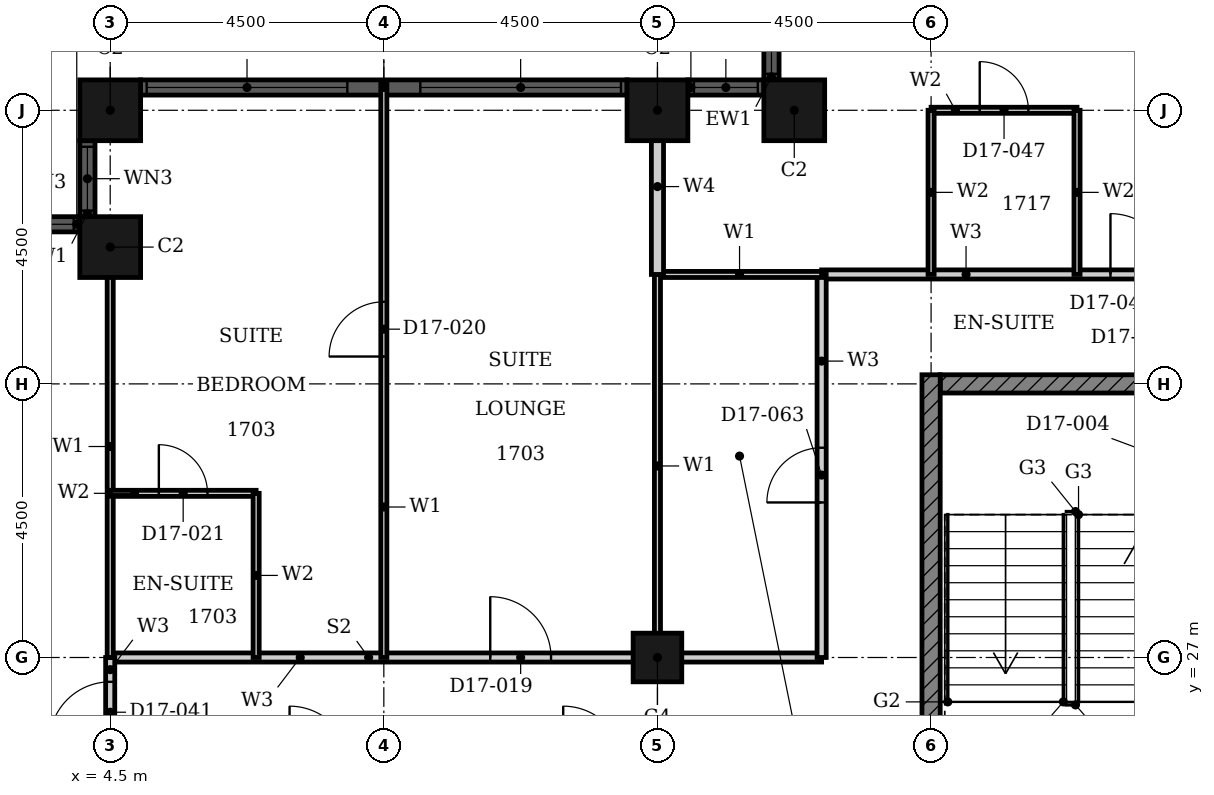
"""IFC4 building model, lengths in metres.
Left out: names, types, materials, properties, quantities, classifications, styles, units other than length and angle.
Written with IfcOpenShell. Run it as: python <this file> out.ifc"""

import sys

from ifc_helpers import new_model, si_unit, direction, frame, frame_2d, origin, origin_2d, place, context, subcontext, project, spatial, rectangle, hollow_rectangle, extrude, element, fill, save


model = new_model("IFC4")
c1 = context("Model", 3, precision=1e-05, world=origin(), true_north=direction((0.0, 1.0)))
c2 = subcontext(c1, "Body", "Model", "MODEL_VIEW")
j1 = project(units=[si_unit("LENGTHUNIT", "METRE"), si_unit("PLANEANGLEUNIT", "RADIAN")], contexts=[c1])
p1 = place(None, origin())
s1 = spatial("IfcSite", under=j1, at=p1, CompositionType="ELEMENT")
p2 = place(p1, origin())
s2 = spatial("IfcBuilding", under=s1, at=p2, CompositionType="ELEMENT")
p3 = place(p2, frame((0.0, 0.0, 74.4)))
s3 = spatial("IfcBuildingStorey", under=s2, at=p3, CompositionType="ELEMENT", Elevation=74.4)
for number, where, z_axis, x_axis in (
    (1, (15.75, 36.0, 0.0), (0.0, 0.0, 1.0), (1.0, 0.0, 0.0)),
    (2, (13.5, 36.0, 0.0), (0.0, 0.0, 1.0), (1.0, 0.0, 0.0)),
    (3, (4.5, 36.0, 0.0), (0.0, 0.0, 1.0), (1.0, 0.0, 0.0)),
    (4, (4.5, 33.75, 0.0), (0.0, 0.0, 1.0), (1.0, 0.0, 0.0)),
):
    element("IfcColumn", number, at=place(p3, frame(where, z_axis=z_axis, x_axis=x_axis)), inside=s3, PredefinedType="COLUMN", context=c2, shape_type="SweptSolid", body=[
        extrude(hollow_rectangle(XDim=1.0, YDim=1.0, WallThickness=0.032, at=origin_2d()), origin(), (0.0, 0.0, 1.0), 3.6),
    ])
p4 = place(p3, frame((13.5, 27.0, 0.0), z_axis=(0.0, 0.0, 1.0), x_axis=(1.0, 0.0, 0.0)))
e5 = element("IfcColumn", 5, at=p4, inside=s3, PredefinedType="COLUMN", context=c2, shape_type="SweptSolid", body=[
    extrude(hollow_rectangle(XDim=0.8, YDim=0.8, WallThickness=0.025, at=origin_2d()), origin(), (0.0, 0.0, 1.0), 3.6),
])
p5 = place(p3, frame((15.375, 37.75, 0.0), z_axis=(0.0, 0.0, 1.0), x_axis=(0.0, -1.0, 0.0)))
e6 = element("IfcWall", 6, at=p5, inside=s3, PredefinedType="SOLIDWALL", context=c2, shape_type="SweptSolid", body=[
    extrude(rectangle(XDim=1.25, YDim=0.25, at=frame_2d((0.625, 0.0))), origin(), (0.0, 0.0, 1.0), 3.6),
])
p6 = place(p5, frame((0.1, 0.0, 0.9)))
e7 = element("IfcOpeningElement", 7, at=p6, cuts=e6, PredefinedType="OPENING", context=c2, shape_type="SweptSolid", body=[
    extrude(rectangle(XDim=1.05, YDim=2.08, at=frame_2d((0.525, 1.04))), frame((0.0, 0.135, 0.0), z_axis=(0.0, -1.0, 0.0), x_axis=(1.0, 0.0, 0.0)), (0.0, 0.0, 1.0), 0.27),
])
p7 = place(p3, frame((15.25, 36.375, 0.0), z_axis=(0.0, 0.0, 1.0), x_axis=(-1.0, 0.0, 0.0)))
e8 = element("IfcWall", 8, at=p7, inside=s3, PredefinedType="SOLIDWALL", context=c2, shape_type="SweptSolid", body=[
    extrude(rectangle(XDim=1.25, YDim=0.25, at=frame_2d((0.625, 0.0))), origin(), (0.0, 0.0, 1.0), 3.6),
])
p8 = place(p7, frame((0.1, 0.0, 0.9)))
e9 = element("IfcOpeningElement", 9, at=p8, cuts=e8, PredefinedType="OPENING", context=c2, shape_type="SweptSolid", body=[
    extrude(rectangle(XDim=1.05, YDim=2.08, at=frame_2d((0.525, 1.04))), frame((0.0, 0.135, 0.0), z_axis=(0.0, -1.0, 0.0), x_axis=(1.0, 0.0, 0.0)), (0.0, 0.0, 1.0), 0.27),
])
p9 = place(p3, frame((13.0, 36.375, 0.0), z_axis=(0.0, 0.0, 1.0), x_axis=(-1.0, 0.0, 0.0)))
e10 = element("IfcWall", 10, at=p9, inside=s3, PredefinedType="SOLIDWALL", context=c2, shape_type="SweptSolid", body=[
    extrude(rectangle(XDim=8.0, YDim=0.25, at=frame_2d((4.0, 0.0))), origin(), (0.0, 0.0, 1.0), 3.6),
])
p10 = place(p9, frame((0.1, 0.0, 0.9)))
e11 = element("IfcOpeningElement", 11, at=p10, cuts=e10, PredefinedType="OPENING", context=c2, shape_type="SweptSolid", body=[
    extrude(rectangle(XDim=3.3, YDim=2.08, at=frame_2d((1.65, 1.04))), frame((0.0, 0.135, 0.0), z_axis=(0.0, -1.0, 0.0), x_axis=(1.0, 0.0, 0.0)), (0.0, 0.0, 1.0), 0.27),
])
p11 = place(p9, frame((4.6, 0.0, 0.9)))
e12 = element("IfcOpeningElement", 12, at=p11, cuts=e10, PredefinedType="OPENING", context=c2, shape_type="SweptSolid", body=[
    extrude(rectangle(XDim=3.3, YDim=2.08, at=frame_2d((1.65, 1.04))), frame((0.0, 0.135, 0.0), z_axis=(0.0, -1.0, 0.0), x_axis=(1.0, 0.0, 0.0)), (0.0, 0.0, 1.0), 0.27),
])
p12 = place(p3, frame((4.125, 35.5, 0.0), z_axis=(0.0, 0.0, 1.0), x_axis=(0.0, -1.0, 0.0)))
e13 = element("IfcWall", 13, at=p12, inside=s3, PredefinedType="SOLIDWALL", context=c2, shape_type="SweptSolid", body=[
    extrude(rectangle(XDim=1.25, YDim=0.25, at=frame_2d((0.625, 0.0))), origin(), (0.0, 0.0, 1.0), 3.6),
])
p13 = place(p12, frame((0.1, 0.0, 0.9)))
e14 = element("IfcOpeningElement", 14, at=p13, cuts=e13, PredefinedType="OPENING", context=c2, shape_type="SweptSolid", body=[
    extrude(rectangle(XDim=1.05, YDim=2.08, at=frame_2d((0.525, 1.04))), frame((0.0, 0.135, 0.0), z_axis=(0.0, -1.0, 0.0), x_axis=(1.0, 0.0, 0.0)), (0.0, 0.0, 1.0), 0.27),
])
p14 = place(p3, frame((4.0, 34.125, 0.0), z_axis=(0.0, 0.0, 1.0), x_axis=(-1.0, 0.0, 0.0)))
e15 = element("IfcWall", 15, at=p14, inside=s3, PredefinedType="SOLIDWALL", context=c2, shape_type="SweptSolid", body=[
    extrude(rectangle(XDim=1.25, YDim=0.25, at=frame_2d((0.625, 0.0))), origin(), (0.0, 0.0, 1.0), 3.6),
])
p15 = place(p14, frame((0.1, 0.0, 0.9)))
e16 = element("IfcOpeningElement", 16, at=p15, cuts=e15, PredefinedType="OPENING", context=c2, shape_type="SweptSolid", body=[
    extrude(rectangle(XDim=1.05, YDim=2.08, at=frame_2d((0.525, 1.04))), frame((0.0, 0.135, 0.0), z_axis=(0.0, -1.0, 0.0), x_axis=(1.0, 0.0, 0.0)), (0.0, 0.0, 1.0), 0.27),
])
p16 = place(p3, frame((18.15, 31.5, 0.0), z_axis=(0.0, 0.0, 1.0), x_axis=(1.0, 0.0, 0.0)))
e17 = element("IfcWall", 17, at=p16, inside=s3, PredefinedType="SHEAR", context=c2, shape_type="SweptSolid", body=[
    extrude(rectangle(XDim=6.797, YDim=0.3, at=frame_2d((3.398, 0.0))), origin(), (0.0, 0.0, 1.0), 3.3),
])
p17 = place(p16, frame((4.736, 0.0, 0.0)))
e18 = element("IfcOpeningElement", 18, at=p17, cuts=e17, PredefinedType="OPENING", context=c2, shape_type="SweptSolid", body=[
    extrude(rectangle(XDim=1.8, YDim=2.1, at=frame_2d((0.9, 1.05))), frame((0.0, 0.16, 0.0), z_axis=(0.0, -1.0, 0.0), x_axis=(1.0, 0.0, 0.0)), (0.0, 0.0, 1.0), 0.32),
])
p18 = place(p3, frame((18.0, 22.35, 0.0), z_axis=(0.0, 0.0, 1.0), x_axis=(0.0, 1.0, 0.0)))
e19 = element("IfcWall", 19, at=p18, inside=s3, PredefinedType="SHEAR", context=c2, shape_type="SweptSolid", body=[
    extrude(rectangle(XDim=9.3, YDim=0.3, at=frame_2d((4.65, 0.0))), origin(), (0.0, 0.0, 1.0), 3.3),
])
p19 = place(p3, frame((4.5, 27.0, 0.0), z_axis=(0.0, 0.0, 1.0), x_axis=(1.0, 0.0, 0.0)))
e20 = element("IfcWall", 20, at=p19, inside=s3, PredefinedType="PARTITIONING", context=c2, shape_type="SweptSolid", body=[
    extrude(rectangle(XDim=11.7, YDim=0.15, at=frame_2d((5.85, 0.0))), origin(), (0.0, 0.0, 1.0), 2.58),
])
p20 = place(p19, frame((6.25, 0.0, 0.0)))
e21 = element("IfcOpeningElement", 21, at=p20, cuts=e20, PredefinedType="OPENING", context=c2, shape_type="SweptSolid", body=[
    extrude(rectangle(XDim=1.0, YDim=2.1, at=frame_2d((0.5, 1.05))), frame((0.0, 0.085, 0.0), z_axis=(0.0, -1.0, 0.0), x_axis=(1.0, 0.0, 0.0)), (0.0, 0.0, 1.0), 0.17),
])
p21 = place(p3, frame((16.2, 33.3, 0.0), z_axis=(0.0, 0.0, 1.0), x_axis=(1.0, 0.0, 0.0)))
e22 = element("IfcWall", 22, at=p21, inside=s3, PredefinedType="PARTITIONING", context=c2, shape_type="SweptSolid", body=[
    extrude(rectangle(XDim=15.3, YDim=0.15, at=frame_2d((7.65, 0.0))), origin(), (0.0, 0.0, 1.0), 3.3),
])
p22 = place(p21, frame((4.75, 0.0, 0.0)))
e23 = element("IfcOpeningElement", 23, at=p22, cuts=e22, PredefinedType="OPENING", context=c2, shape_type="SweptSolid", body=[
    extrude(rectangle(XDim=1.0, YDim=2.1, at=frame_2d((0.5, 1.05))), frame((0.0, 0.085, 0.0), z_axis=(0.0, -1.0, 0.0), x_axis=(1.0, 0.0, 0.0)), (0.0, 0.0, 1.0), 0.17),
])
p23 = place(p21, frame((7.65, 0.0, 0.0)))
e24 = element("IfcOpeningElement", 24, at=p23, cuts=e22, PredefinedType="OPENING", context=c2, shape_type="SweptSolid", body=[
    extrude(rectangle(XDim=0.9, YDim=2.1, at=frame_2d((0.45, 1.05))), frame((0.0, 0.085, 0.0), z_axis=(0.0, -1.0, 0.0), x_axis=(1.0, 0.0, 0.0)), (0.0, 0.0, 1.0), 0.17),
])
p24 = place(p21, frame((12.15, 0.0, 0.0)))
e25 = element("IfcOpeningElement", 25, at=p24, cuts=e22, PredefinedType="OPENING", context=c2, shape_type="SweptSolid", body=[
    extrude(rectangle(XDim=0.9, YDim=2.1, at=frame_2d((0.45, 1.05))), frame((0.0, 0.085, 0.0), z_axis=(0.0, -1.0, 0.0), x_axis=(1.0, 0.0, 0.0)), (0.0, 0.0, 1.0), 0.17),
])
p25 = place(p3, frame((16.2, 27.0, 0.0), z_axis=(0.0, 0.0, 1.0), x_axis=(0.0, 1.0, 0.0)))
e26 = element("IfcWall", 26, at=p25, inside=s3, PredefinedType="PARTITIONING", context=c2, shape_type="SweptSolid", body=[
    extrude(rectangle(XDim=6.3, YDim=0.15, at=frame_2d((3.15, 0.0))), origin(), (0.0, 0.0, 1.0), 3.3),
])
p26 = place(p25, frame((2.55, 0.0, 0.0)))
e27 = element("IfcOpeningElement", 27, at=p26, cuts=e26, PredefinedType="OPENING", context=c2, shape_type="SweptSolid", body=[
    extrude(rectangle(XDim=0.9, YDim=2.1, at=frame_2d((0.45, 1.05))), frame((0.0, 0.085, 0.0), z_axis=(0.0, -1.0, 0.0), x_axis=(1.0, 0.0, 0.0)), (0.0, 0.0, 1.0), 0.17),
])
p27 = place(p3, frame((4.5, 25.2, 0.0), z_axis=(0.0, 0.0, 1.0), x_axis=(0.0, 1.0, 0.0)))
e28 = element("IfcWall", 28, at=p27, inside=s3, PredefinedType="PARTITIONING", context=c2, shape_type="SweptSolid", body=[
    extrude(rectangle(XDim=1.8, YDim=0.15, at=frame_2d((0.9, 0.0))), origin(), (0.0, 0.0, 1.0), 3.3),
])
p28 = place(p27, frame((0.4, 0.0, 0.0)))
e29 = element("IfcOpeningElement", 29, at=p28, cuts=e28, PredefinedType="OPENING", context=c2, shape_type="SweptSolid", body=[
    extrude(rectangle(XDim=1.0, YDim=2.1, at=frame_2d((0.5, 1.05))), frame((0.0, 0.085, 0.0), z_axis=(0.0, -1.0, 0.0), x_axis=(1.0, 0.0, 0.0)), (0.0, 0.0, 1.0), 0.17),
])
p29 = place(p3, frame((13.5, 33.3, 0.0), z_axis=(0.0, 0.0, 1.0), x_axis=(1.0, 0.0, 0.0)))
e30 = element("IfcWall", 30, at=p29, inside=s3, PredefinedType="PARTITIONING", context=c2, shape_type="SweptSolid", body=[
    extrude(rectangle(XDim=2.7, YDim=0.1, at=frame_2d((1.35, 0.0))), origin(), (0.0, 0.0, 1.0), 3.3),
])
p30 = place(p3, frame((13.5, 27.0, 0.0), z_axis=(0.0, 0.0, 1.0), x_axis=(0.0, 1.0, 0.0)))
e31 = element("IfcWall", 31, at=p30, inside=s3, PredefinedType="PARTITIONING", context=c2, shape_type="SweptSolid", body=[
    extrude(rectangle(XDim=6.3, YDim=0.1, at=frame_2d((3.15, 0.0))), origin(), (0.0, 0.0, 1.0), 2.38),
])
p31 = place(p3, frame((4.5, 27.0, 0.0), z_axis=(0.0, 0.0, 1.0), x_axis=(0.0, 1.0, 0.0)))
e32 = element("IfcWall", 32, at=p31, inside=s3, PredefinedType="PARTITIONING", context=c2, shape_type="SweptSolid", body=[
    extrude(rectangle(XDim=6.94, YDim=0.1, at=frame_2d((3.47, 0.0))), origin(), (0.0, 0.0, 1.0), 3.3),
])
p32 = place(p3, frame((9.0, 27.0, 0.0), z_axis=(0.0, 0.0, 1.0), x_axis=(0.0, 1.0, 0.0)))
e33 = element("IfcWall", 33, at=p32, inside=s3, PredefinedType="PARTITIONING", context=c2, shape_type="SweptSolid", body=[
    extrude(rectangle(XDim=9.44, YDim=0.1, at=frame_2d((4.72, 0.0))), origin(), (0.0, 0.0, 1.0), 3.3),
])
p33 = place(p32, frame((4.95, 0.0, 0.0)))
e34 = element("IfcOpeningElement", 34, at=p33, cuts=e33, PredefinedType="OPENING", context=c2, shape_type="SweptSolid", body=[
    extrude(rectangle(XDim=0.9, YDim=2.1, at=frame_2d((0.45, 1.05))), frame((0.0, 0.06, 0.0), z_axis=(0.0, -1.0, 0.0), x_axis=(1.0, 0.0, 0.0)), (0.0, 0.0, 1.0), 0.12),
])
p34 = place(p3, frame((13.5, 33.3, 0.0), z_axis=(0.0, 0.0, 1.0), x_axis=(0.0, 1.0, 0.0)))
e35 = element("IfcWall", 35, at=p34, inside=s3, PredefinedType="PARTITIONING", context=c2, shape_type="SweptSolid", body=[
    extrude(rectangle(XDim=2.89, YDim=0.2, at=frame_2d((1.445, 0.0))), origin(), (0.0, 0.0, 1.0), 2.38),
])
p35 = place(p3, frame((4.5, 29.7, 0.0), z_axis=(0.0, 0.0, 1.0), x_axis=(1.0, 0.0, 0.0)))
e36 = element("IfcWall", 36, at=p35, inside=s3, PredefinedType="PARTITIONING", context=c2, shape_type="SweptSolid", body=[
    extrude(rectangle(XDim=2.4, YDim=0.1, at=frame_2d((1.2, 0.0))), origin(), (0.0, 0.0, 1.0), 3.3),
])
p36 = place(p35, frame((0.8, 0.0, 0.0)))
e37 = element("IfcOpeningElement", 37, at=p36, cuts=e36, PredefinedType="OPENING", context=c2, shape_type="SweptSolid", body=[
    extrude(rectangle(XDim=0.8, YDim=2.1, at=frame_2d((0.4, 1.05))), frame((0.0, 0.06, 0.0), z_axis=(0.0, -1.0, 0.0), x_axis=(1.0, 0.0, 0.0)), (0.0, 0.0, 1.0), 0.12),
])
p37 = place(p3, frame((18.0, 36.0, 0.0), z_axis=(0.0, 0.0, 1.0), x_axis=(1.0, 0.0, 0.0)))
e38 = element("IfcWall", 38, at=p37, inside=s3, PredefinedType="PARTITIONING", context=c2, shape_type="SweptSolid", body=[
    extrude(rectangle(XDim=2.4, YDim=0.1, at=frame_2d((1.2, 0.0))), origin(), (0.0, 0.0, 1.0), 3.3),
])
p38 = place(p37, frame((0.8, 0.0, 0.0)))
e39 = element("IfcOpeningElement", 39, at=p38, cuts=e38, PredefinedType="OPENING", context=c2, shape_type="SweptSolid", body=[
    extrude(rectangle(XDim=0.8, YDim=2.1, at=frame_2d((0.4, 1.05))), frame((0.0, 0.06, 0.0), z_axis=(0.0, -1.0, 0.0), x_axis=(1.0, 0.0, 0.0)), (0.0, 0.0, 1.0), 0.12),
])
for number, where, z_axis, x_axis in (
    (40, (18.0, 33.3, 0.0), (0.0, 0.0, 1.0), (0.0, 1.0, 0.0)),
    (41, (20.4, 33.3, 0.0), (0.0, 0.0, 1.0), (0.0, 1.0, 0.0)),
    (42, (6.9, 27.0, 0.0), (0.0, 0.0, 1.0), (0.0, 1.0, 0.0)),
):
    element("IfcWall", number, at=place(p3, frame(where, z_axis=z_axis, x_axis=x_axis)), inside=s3, PredefinedType="PARTITIONING", context=c2, shape_type="SweptSolid", body=[
        extrude(rectangle(XDim=2.7, YDim=0.1, at=frame_2d((1.35, 0.0))), origin(), (0.0, 0.0, 1.0), 3.3),
    ])
p39 = place(p6, origin())
e43 = element("IfcWindow", 43, at=p39, inside=s3, PartitioningType="SINGLE_PANEL", PredefinedType="WINDOW", context=c2, shape_type="SweptSolid", body=[
    extrude(rectangle(XDim=1.05, YDim=2.08, at=frame_2d((0.525, 1.04))), frame((0.0, 0.03, 0.0), z_axis=(0.0, -1.0, 0.0), x_axis=(1.0, 0.0, 0.0)), (0.0, 0.0, 1.0), 0.06),
])
fill(e7, e43)
p40 = place(p8, origin())
e44 = element("IfcWindow", 44, at=p40, inside=s3, PartitioningType="SINGLE_PANEL", PredefinedType="WINDOW", context=c2, shape_type="SweptSolid", body=[
    extrude(rectangle(XDim=1.05, YDim=2.08, at=frame_2d((0.525, 1.04))), frame((0.0, 0.03, 0.0), z_axis=(0.0, -1.0, 0.0), x_axis=(1.0, 0.0, 0.0)), (0.0, 0.0, 1.0), 0.06),
])
fill(e9, e44)
p41 = place(p10, origin())
e45 = element("IfcWindow", 45, at=p41, inside=s3, PartitioningType="SINGLE_PANEL", PredefinedType="WINDOW", context=c2, shape_type="SweptSolid", body=[
    extrude(rectangle(XDim=3.3, YDim=2.08, at=frame_2d((1.65, 1.04))), frame((0.0, 0.03, 0.0), z_axis=(0.0, -1.0, 0.0), x_axis=(1.0, 0.0, 0.0)), (0.0, 0.0, 1.0), 0.06),
])
fill(e11, e45)
p42 = place(p11, origin())
e46 = element("IfcWindow", 46, at=p42, inside=s3, PartitioningType="SINGLE_PANEL", PredefinedType="WINDOW", context=c2, shape_type="SweptSolid", body=[
    extrude(rectangle(XDim=3.3, YDim=2.08, at=frame_2d((1.65, 1.04))), frame((0.0, 0.03, 0.0), z_axis=(0.0, -1.0, 0.0), x_axis=(1.0, 0.0, 0.0)), (0.0, 0.0, 1.0), 0.06),
])
fill(e12, e46)
p43 = place(p13, origin())
e47 = element("IfcWindow", 47, at=p43, inside=s3, PartitioningType="SINGLE_PANEL", PredefinedType="WINDOW", context=c2, shape_type="SweptSolid", body=[
    extrude(rectangle(XDim=1.05, YDim=2.08, at=frame_2d((0.525, 1.04))), frame((0.0, 0.03, 0.0), z_axis=(0.0, -1.0, 0.0), x_axis=(1.0, 0.0, 0.0)), (0.0, 0.0, 1.0), 0.06),
])
fill(e14, e47)
p44 = place(p15, origin())
e48 = element("IfcWindow", 48, at=p44, inside=s3, PartitioningType="SINGLE_PANEL", PredefinedType="WINDOW", context=c2, shape_type="SweptSolid", body=[
    extrude(rectangle(XDim=1.05, YDim=2.08, at=frame_2d((0.525, 1.04))), frame((0.0, 0.03, 0.0), z_axis=(0.0, -1.0, 0.0), x_axis=(1.0, 0.0, 0.0)), (0.0, 0.0, 1.0), 0.06),
])
fill(e16, e48)
p45 = place(p20, origin())
e49 = element("IfcDoor", 49, at=p45, inside=s3, OperationType="SINGLE_SWING_LEFT", PredefinedType="DOOR", context=c2, shape_type="SweptSolid", body=[
    extrude(rectangle(XDim=1.0, YDim=2.1, at=frame_2d((0.5, 1.05))), frame((0.0, 0.025, 0.0), z_axis=(0.0, -1.0, 0.0), x_axis=(1.0, 0.0, 0.0)), (0.0, 0.0, 1.0), 0.05),
])
fill(e21, e49)
p46 = place(p33, origin())
e50 = element("IfcDoor", 50, at=p46, inside=s3, OperationType="SINGLE_SWING_RIGHT", PredefinedType="DOOR", context=c2, shape_type="SweptSolid", body=[
    extrude(rectangle(XDim=0.9, YDim=2.1, at=frame_2d((0.45, 1.05))), frame((0.0, 0.025, 0.0), z_axis=(0.0, -1.0, 0.0), x_axis=(1.0, 0.0, 0.0)), (0.0, 0.0, 1.0), 0.05),
])
fill(e34, e50)
p47 = place(p36, origin())
e51 = element("IfcDoor", 51, at=p47, inside=s3, OperationType="SINGLE_SWING_LEFT", PredefinedType="DOOR", context=c2, shape_type="SweptSolid", body=[
    extrude(rectangle(XDim=0.8, YDim=2.1, at=frame_2d((0.4, 1.05))), frame((0.0, 0.025, 0.0), z_axis=(0.0, -1.0, 0.0), x_axis=(1.0, 0.0, 0.0)), (0.0, 0.0, 1.0), 0.05),
])
fill(e37, e51)
p48 = place(p28, origin())
e52 = element("IfcDoor", 52, at=p48, inside=s3, OperationType="SINGLE_SWING_RIGHT", PredefinedType="DOOR", context=c2, shape_type="SweptSolid", body=[
    extrude(rectangle(XDim=1.0, YDim=2.1, at=frame_2d((0.5, 1.05))), frame((0.0, 0.025, 0.0), z_axis=(0.0, -1.0, 0.0), x_axis=(1.0, 0.0, 0.0)), (0.0, 0.0, 1.0), 0.05),
])
fill(e29, e52)
p49 = place(p22, origin())
e53 = element("IfcDoor", 53, at=p49, inside=s3, OperationType="SINGLE_SWING_RIGHT", PredefinedType="DOOR", context=c2, shape_type="SweptSolid", body=[
    extrude(rectangle(XDim=1.0, YDim=2.1, at=frame_2d((0.5, 1.05))), frame((0.0, 0.025, 0.0), z_axis=(0.0, -1.0, 0.0), x_axis=(1.0, 0.0, 0.0)), (0.0, 0.0, 1.0), 0.05),
])
fill(e23, e53)
p50 = place(p38, origin())
e54 = element("IfcDoor", 54, at=p50, inside=s3, OperationType="SINGLE_SWING_LEFT", PredefinedType="DOOR", context=c2, shape_type="SweptSolid", body=[
    extrude(rectangle(XDim=0.8, YDim=2.1, at=frame_2d((0.4, 1.05))), frame((0.0, 0.025, 0.0), z_axis=(0.0, -1.0, 0.0), x_axis=(1.0, 0.0, 0.0)), (0.0, 0.0, 1.0), 0.05),
])
fill(e39, e54)
p51 = place(p26, origin())
e55 = element("IfcDoor", 55, at=p51, inside=s3, OperationType="SINGLE_SWING_LEFT", PredefinedType="DOOR", context=c2, shape_type="SweptSolid", body=[
    extrude(rectangle(XDim=0.9, YDim=2.1, at=frame_2d((0.45, 1.05))), frame((0.0, 0.025, 0.0), z_axis=(0.0, -1.0, 0.0), x_axis=(1.0, 0.0, 0.0)), (0.0, 0.0, 1.0), 0.05),
])
fill(e27, e55)
save(model, sys.argv[1])
